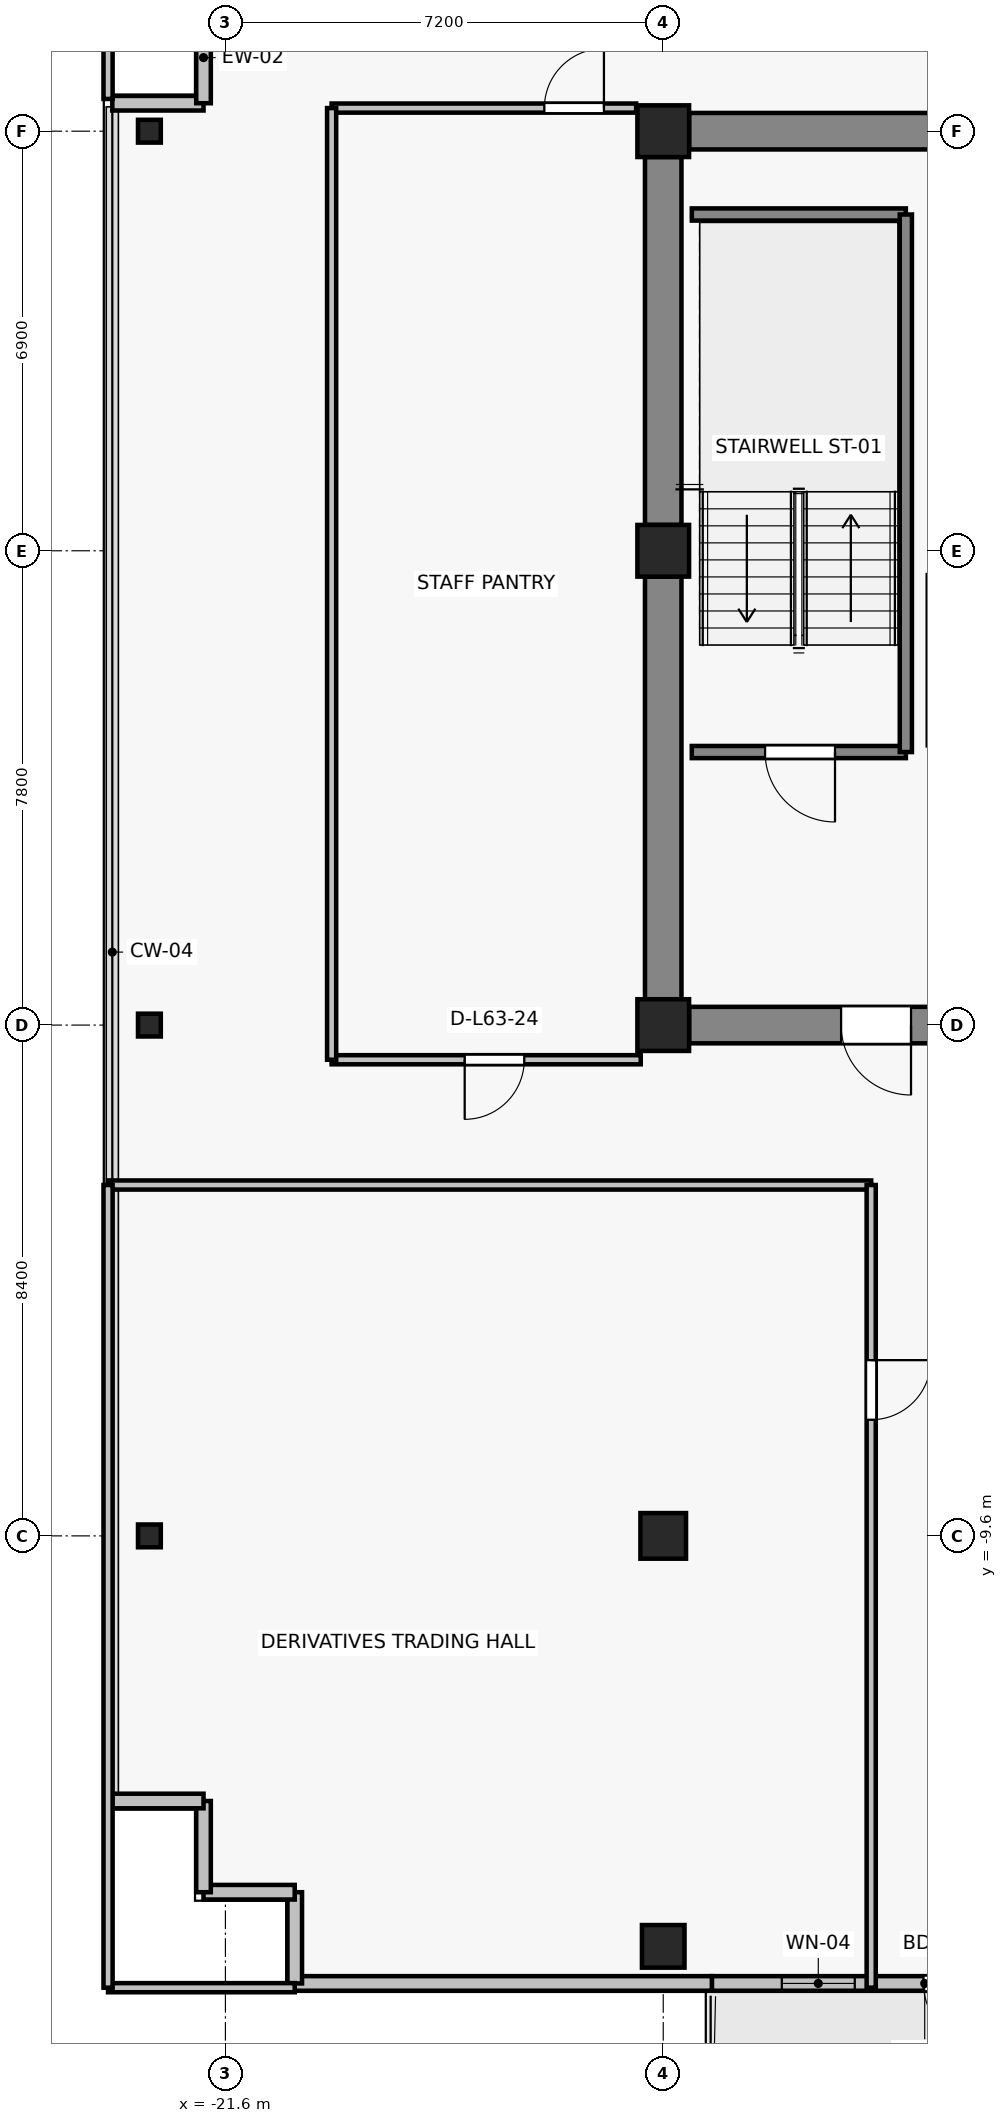
"""IFC4 building model, lengths in metres.
Left out: names, types, materials, properties, quantities, classifications, styles, units other than length and angle.
Written with IfcOpenShell. Run it as: python <this file> out.ifc"""

import sys

from ifc_helpers import new_model, si_unit, direction, frame, frame_2d, origin, origin_2d, place, context, subcontext, project, spatial, rectangle, i_section, extrude, source, transform, mapped, element, fill, save


model = new_model("IFC4")
c1 = context("Model", 3, precision=1e-05, world=origin(), true_north=direction((0.0, 1.0)))
c2 = subcontext(c1, "Body", "Model", "MODEL_VIEW")
j1 = project(units=[si_unit("LENGTHUNIT", "METRE"), si_unit("PLANEANGLEUNIT", "RADIAN")], contexts=[c1])
p1 = place(None, origin())
s1 = spatial("IfcSite", under=j1, at=p1, CompositionType="ELEMENT")
p2 = place(p1, origin())
s2 = spatial("IfcBuilding", under=s1, at=p2, CompositionType="ELEMENT")
p3 = place(p2, frame((0.0, 0.0, 225.4)))
s3 = spatial("IfcBuildingStorey", under=s2, at=p3, CompositionType="ELEMENT", Elevation=225.4)
for number, where, z_axis, x_axis in (
    (1, (-14.4, -1.2, 0.0), (0.0, 0.0, 1.0), (1.0, 0.0, 0.0)),
    (2, (-14.4, 6.6, 0.0), (0.0, 0.0, 1.0), (1.0, 0.0, 0.0)),
    (3, (-14.4, 13.5, 0.0), (0.0, 0.0, 1.0), (1.0, 0.0, 0.0)),
):
    element("IfcColumn", number, at=place(p3, frame(where, z_axis=z_axis, x_axis=x_axis)), inside=s3, PredefinedType="COLUMN", context=c2, shape_type="SweptSolid", body=[
        extrude(rectangle(XDim=0.85, YDim=0.85, at=origin_2d()), origin(), (0.0, 0.0, 1.0), 3.3),
    ])
p4 = place(p3, frame((-14.4, -9.6, 0.0), z_axis=(0.0, 0.0, 1.0), x_axis=(1.0, 0.0, 0.0)))
e4 = element("IfcColumn", 4, at=p4, inside=s3, PredefinedType="COLUMN", context=c2, shape_type="SweptSolid", body=[
    extrude(rectangle(XDim=0.75, YDim=0.75, at=origin_2d()), origin(), (0.0, 0.0, 1.0), 3.3),
])
p5 = place(p3, frame((-14.4, -16.35, 0.0), z_axis=(0.0, 0.0, 1.0), x_axis=(1.0, 0.0, 0.0)))
e5 = element("IfcColumn", 5, at=p5, inside=s3, PredefinedType="COLUMN", context=c2, shape_type="SweptSolid", body=[
    extrude(rectangle(XDim=0.7, YDim=0.7, at=origin_2d()), origin(), (0.0, 0.0, 1.0), 3.3),
])
for number, where, z_axis, x_axis in (
    (6, (-22.85, -9.6, 0.0), (0.0, 0.0, 1.0), (1.0, 0.0, 0.0)),
    (7, (-22.85, -1.2, 0.0), (0.0, 0.0, 1.0), (1.0, 0.0, 0.0)),
    (8, (-22.85, 13.5, 0.0), (0.0, 0.0, 1.0), (1.0, 0.0, 0.0)),
):
    element("IfcColumn", number, at=place(p3, frame(where, z_axis=z_axis, x_axis=x_axis)), inside=s3, PredefinedType="COLUMN", context=c2, shape_type="SweptSolid", body=[
        extrude(i_section(OverallWidth=0.375, OverallDepth=0.375, WebThickness=0.017, FlangeThickness=0.027, FilletRadius=0.015, at=origin_2d()), origin(), (0.0, 0.0, 1.0), 3.3),
    ])
p6 = place(p3, frame((-13.975, 13.5, 0.0), z_axis=(0.0, 0.0, 1.0), x_axis=(1.0, 0.0, 0.0)))
e9 = element("IfcWall", 9, at=p6, inside=s3, PredefinedType="SHEAR", context=c2, shape_type="SweptSolid", body=[
    extrude(rectangle(XDim=6.35, YDim=0.6, at=frame_2d((3.175, 0.0))), origin(), (0.0, 0.0, 1.0), 3.075),
])
p7 = place(p3, frame((-14.4, -0.775, 0.0), z_axis=(0.0, 0.0, 1.0), x_axis=(0.0, 1.0, 0.0)))
e10 = element("IfcWall", 10, at=p7, inside=s3, PredefinedType="SHEAR", context=c2, shape_type="SweptSolid", body=[
    extrude(rectangle(XDim=6.95, YDim=0.6, at=frame_2d((3.475, 0.0))), origin(), (0.0, 0.0, 1.0), 3.075),
])
p8 = place(p3, frame((-14.4, 7.025, 0.0), z_axis=(0.0, 0.0, 1.0), x_axis=(0.0, 1.0, 0.0)))
e11 = element("IfcWall", 11, at=p8, inside=s3, PredefinedType="SHEAR", context=c2, shape_type="SweptSolid", body=[
    extrude(rectangle(XDim=6.05, YDim=0.6, at=frame_2d((3.025, 0.0))), origin(), (0.0, 0.0, 1.0), 3.075),
])
p9 = place(p3, frame((-7.625, -1.2, 0.0), z_axis=(0.0, 0.0, 1.0), x_axis=(-1.0, 0.0, 0.0)))
e12 = element("IfcWall", 12, at=p9, inside=s3, PredefinedType="SHEAR", context=c2, shape_type="SweptSolid", body=[
    extrude(rectangle(XDim=6.35, YDim=0.6, at=frame_2d((3.175, 0.0))), origin(), (0.0, 0.0, 1.0), 3.075),
])
p10 = place(p9, frame((2.7, 0.0, 0.0)))
e13 = element("IfcOpeningElement", 13, at=p10, cuts=e12, PredefinedType="OPENING", context=c2, shape_type="SweptSolid", body=[
    extrude(rectangle(XDim=1.15, YDim=2.15, at=frame_2d((0.575, 1.075))), frame((0.0, 0.31, 0.0), z_axis=(0.0, -1.0, 0.0), x_axis=(1.0, 0.0, 0.0)), (0.0, 0.0, 1.0), 0.62),
])
p11 = place(p3, frame((-6.6, -16.96, 0.0), z_axis=(0.0, 0.0, 1.0), x_axis=(-1.0, 0.0, 0.0)))
e14 = element("IfcWall", 14, at=p11, inside=s3, PredefinedType="SOLIDWALL", context=c2, shape_type="SweptSolid", body=[
    extrude(rectangle(XDim=7.0, YDim=0.24, at=frame_2d((3.5, 0.0))), origin(), (0.0, 0.0, 1.0), 2.665),
])
p12 = place(p11, frame((2.52, 0.0, 0.0)))
e15 = element("IfcOpeningElement", 15, at=p12, cuts=e14, PredefinedType="OPENING", context=c2, shape_type="SweptSolid", body=[
    extrude(rectangle(XDim=1.0, YDim=2.2, at=frame_2d((0.5, 1.1))), frame((0.0, 0.13, 0.0), z_axis=(0.0, -1.0, 0.0), x_axis=(1.0, 0.0, 0.0)), (0.0, 0.0, 1.0), 0.26),
])
p13 = place(p11, frame((4.65, 0.0, 0.85)))
e16 = element("IfcOpeningElement", 16, at=p13, cuts=e14, PredefinedType="OPENING", context=c2, shape_type="SweptSolid", body=[
    extrude(rectangle(XDim=1.2, YDim=1.5, at=frame_2d((0.6, 0.75))), frame((0.0, 0.13, 0.0), z_axis=(0.0, -1.0, 0.0), x_axis=(1.0, 0.0, 0.0)), (0.0, 0.0, 1.0), 0.26),
])
for number, where, z_axis, x_axis in (
    (17, (-21.96, 13.96, 0.0), (0.0, 0.0, 1.0), (-1.0, 0.0, 0.0)),
    (18, (-21.96, 15.46, 0.0), (0.0, 0.0, 1.0), (0.0, -1.0, 0.0)),
):
    element("IfcWall", number, at=place(p3, frame(where, z_axis=z_axis, x_axis=x_axis)), inside=s3, PredefinedType="SOLIDWALL", context=c2, shape_type="SweptSolid", body=[
        extrude(rectangle(XDim=1.5, YDim=0.24, at=frame_2d((0.75, 0.0))), origin(), (0.0, 0.0, 1.0), 3.075),
    ])
p14 = place(p3, frame((-20.46, -16.96, 0.0), z_axis=(0.0, 0.0, 1.0), x_axis=(1.0, 0.0, 0.0)))
e19 = element("IfcWall", 19, at=p14, inside=s3, PredefinedType="SOLIDWALL", context=c2, shape_type="SweptSolid", body=[
    extrude(rectangle(XDim=6.86, YDim=0.24, at=frame_2d((3.43, 0.0))), origin(), (0.0, 0.0, 1.0), 2.665),
])
for number, where, z_axis, x_axis in (
    (20, (-20.46, -15.46, 0.0), (0.0, 0.0, 1.0), (0.0, -1.0, 0.0)),
    (21, (-21.96, -15.46, 0.0), (0.0, 0.0, 1.0), (1.0, 0.0, 0.0)),
    (22, (-21.96, -13.96, 0.0), (0.0, 0.0, 1.0), (0.0, -1.0, 0.0)),
    (23, (-23.46, -13.96, 0.0), (0.0, 0.0, 1.0), (1.0, 0.0, 0.0)),
):
    element("IfcWall", number, at=place(p3, frame(where, z_axis=z_axis, x_axis=x_axis)), inside=s3, PredefinedType="SOLIDWALL", context=c2, shape_type="SweptSolid", body=[
        extrude(rectangle(XDim=1.5, YDim=0.24, at=frame_2d((0.75, 0.0))), origin(), (0.0, 0.0, 1.0), 3.075),
    ])
p15 = place(p3, frame((-10.41, 3.29, 0.0), z_axis=(0.0, 0.0, 1.0), x_axis=(-1.0, 0.0, 0.0)))
e24 = element("IfcWall", 24, at=p15, inside=s3, PredefinedType="SOLIDWALL", context=c2, shape_type="SweptSolid", body=[
    extrude(rectangle(XDim=3.52, YDim=0.2, at=frame_2d((1.76, 0.0))), origin(), (0.0, 0.0, 1.0), 3.075),
])
p16 = place(p15, frame((1.165, 0.0, 0.0)))
e25 = element("IfcOpeningElement", 25, at=p16, cuts=e24, PredefinedType="OPENING", context=c2, shape_type="SweptSolid", body=[
    extrude(rectangle(XDim=1.15, YDim=2.15, at=frame_2d((0.575, 1.075))), frame((0.0, 0.11, 0.0), z_axis=(0.0, -1.0, 0.0), x_axis=(1.0, 0.0, 0.0)), (0.0, 0.0, 1.0), 0.22),
])
p17 = place(p3, frame((-13.93, 12.13, 0.0), z_axis=(0.0, 0.0, 1.0), x_axis=(1.0, 0.0, 0.0)))
e26 = element("IfcWall", 26, at=p17, inside=s3, PredefinedType="SOLIDWALL", context=c2, shape_type="SweptSolid", body=[
    extrude(rectangle(XDim=3.52, YDim=0.2, at=frame_2d((1.76, 0.0))), origin(), (0.0, 0.0, 1.0), 3.075),
])
p18 = place(p3, frame((-10.41, 12.13, 0.0), z_axis=(0.0, 0.0, 1.0), x_axis=(0.0, -1.0, 0.0)))
e27 = element("IfcWall", 27, at=p18, inside=s3, PredefinedType="SOLIDWALL", context=c2, shape_type="SweptSolid", body=[
    extrude(rectangle(XDim=8.84, YDim=0.2, at=frame_2d((4.42, 0.0))), origin(), (0.0, 0.0, 1.0), 3.075),
])
p19 = place(p3, frame((-20.46, -17.03, 0.0), z_axis=(0.0, 0.0, 1.0), x_axis=(-1.0, 0.0, 0.0)))
e28 = element("IfcWall", 28, at=p19, inside=s3, PredefinedType="PARTITIONING", context=c2, shape_type="SweptSolid", body=[
    extrude(rectangle(XDim=3.07, YDim=0.15, at=frame_2d((1.535, 0.0))), origin(), (0.0, 0.0, 1.0), 2.665),
])
p20 = place(p3, frame((-23.53, -3.83, 0.0), z_axis=(0.0, 0.0, 1.0), x_axis=(1.0, 0.0, 0.0)))
e29 = element("IfcWall", 29, at=p20, inside=s3, PredefinedType="PARTITIONING", context=c2, shape_type="SweptSolid", body=[
    extrude(rectangle(XDim=12.55, YDim=0.15, at=frame_2d((6.275, 0.0))), origin(), (0.0, 0.0, 1.0), 2.615),
])
p21 = place(p3, frame((-23.53, -17.03, 0.0), z_axis=(0.0, 0.0, 1.0), x_axis=(0.0, 1.0, 0.0)))
e30 = element("IfcWall", 30, at=p21, inside=s3, PredefinedType="PARTITIONING", context=c2, shape_type="SweptSolid", body=[
    extrude(rectangle(XDim=13.2, YDim=0.15, at=frame_2d((6.6, 0.0))), origin(), (0.0, 0.0, 1.0), 2.665),
])
p22 = place(p3, frame((-10.98, -3.83, 0.0), z_axis=(0.0, 0.0, 1.0), x_axis=(0.0, -1.0, 0.0)))
e31 = element("IfcWall", 31, at=p22, inside=s3, PredefinedType="PARTITIONING", context=c2, shape_type="SweptSolid", body=[
    extrude(rectangle(XDim=13.2, YDim=0.15, at=frame_2d((6.6, 0.0))), origin(), (0.0, 0.0, 1.0), 2.615),
])
p23 = place(p22, frame((2.88, 0.0, 0.0)))
e32 = element("IfcOpeningElement", 32, at=p23, cuts=e31, PredefinedType="OPENING", context=c2, shape_type="SweptSolid", body=[
    extrude(rectangle(XDim=0.98, YDim=2.15, at=frame_2d((0.49, 1.075))), frame((0.0, 0.085, 0.0), z_axis=(0.0, -1.0, 0.0), x_axis=(1.0, 0.0, 0.0)), (0.0, 0.0, 1.0), 0.17),
])
p24 = place(p3, frame((-14.77, -1.77, 0.0), z_axis=(0.0, 0.0, 1.0), x_axis=(-1.0, 0.0, 0.0)))
e33 = element("IfcWall", 33, at=p24, inside=s3, PredefinedType="PARTITIONING", context=c2, shape_type="SweptSolid", body=[
    extrude(rectangle(XDim=5.083, YDim=0.15, at=frame_2d((2.542, 0.0))), origin(), (0.0, 0.0, 1.0), 3.075),
])
p25 = place(p24, frame((1.915, 0.0, 0.0)))
e34 = element("IfcOpeningElement", 34, at=p25, cuts=e33, PredefinedType="OPENING", context=c2, shape_type="SweptSolid", body=[
    extrude(rectangle(XDim=0.98, YDim=2.15, at=frame_2d((0.49, 1.075))), frame((0.0, 0.085, 0.0), z_axis=(0.0, -1.0, 0.0), x_axis=(1.0, 0.0, 0.0)), (0.0, 0.0, 1.0), 0.17),
])
p26 = place(p3, frame((-19.853, 13.88, 0.0), z_axis=(0.0, 0.0, 1.0), x_axis=(1.0, 0.0, 0.0)))
e35 = element("IfcWall", 35, at=p26, inside=s3, PredefinedType="PARTITIONING", context=c2, shape_type="SweptSolid", body=[
    extrude(rectangle(XDim=5.008, YDim=0.15, at=frame_2d((2.504, 0.0))), origin(), (0.0, 0.0, 1.0), 3.075),
])
p27 = place(p26, frame((3.498, 0.0, 0.0)))
e36 = element("IfcOpeningElement", 36, at=p27, cuts=e35, PredefinedType="OPENING", context=c2, shape_type="SweptSolid", body=[
    extrude(rectangle(XDim=0.98, YDim=2.15, at=frame_2d((0.49, 1.075))), frame((0.0, 0.085, 0.0), z_axis=(0.0, -1.0, 0.0), x_axis=(1.0, 0.0, 0.0)), (0.0, 0.0, 1.0), 0.17),
])
p28 = place(p3, frame((-19.853, -1.77, 0.0), z_axis=(0.0, 0.0, 1.0), x_axis=(0.0, 1.0, 0.0)))
e37 = element("IfcWall", 37, at=p28, inside=s3, PredefinedType="PARTITIONING", context=c2, shape_type="SweptSolid", body=[
    extrude(rectangle(XDim=15.65, YDim=0.15, at=frame_2d((7.825, 0.0))), origin(), (0.0, 0.0, 1.0), 2.615),
])
p29 = place(p3, frame((-23.53, 14.03, 0.0), z_axis=(0.0, 0.0, 1.0), x_axis=(0.0, 1.0, 0.0)))
e38 = element("IfcWall", 38, at=p29, inside=s3, PredefinedType="PARTITIONING", context=c2, shape_type="SweptSolid", body=[
    extrude(rectangle(XDim=3.0, YDim=0.15, at=frame_2d((1.5, 0.0))), origin(), (0.0, 0.0, 1.0), 3.075),
])
m1 = source(origin(), c2, "Body", "SweptSolid", [
    extrude(rectangle(XDim=1.0, YDim=2.2, at=frame_2d((0.5, 1.1))), frame((0.0, 0.025, 0.0), z_axis=(0.0, -1.0, 0.0), x_axis=(1.0, 0.0, 0.0)), (0.0, 0.0, 1.0), 0.05),
])
p30 = place(p12, origin())
e39 = element("IfcDoor", 39, at=p30, inside=s3, OperationType="SINGLE_SWING_LEFT", PredefinedType="DOOR", context=c2, shape_type="MappedRepresentation", body=[
    mapped(m1, transform((0.0, 0.0, 0.0), x_axis=(1.0, 0.0, 0.0), y_axis=(0.0, 1.0, 0.0), z_axis=(0.0, 0.0, 1.0), scale=1.0)),
])
fill(e15, e39)
m2 = source(origin(), c2, "Body", "SweptSolid", [
    extrude(rectangle(XDim=1.2, YDim=1.5, at=frame_2d((0.6, 0.75))), frame((0.0, 0.03, 0.0), z_axis=(0.0, -1.0, 0.0), x_axis=(1.0, 0.0, 0.0)), (0.0, 0.0, 1.0), 0.06),
])
p31 = place(p13, origin())
e40 = element("IfcWindow", 40, at=p31, inside=s3, PartitioningType="SINGLE_PANEL", PredefinedType="WINDOW", context=c2, shape_type="MappedRepresentation", body=[
    mapped(m2, transform((0.0, 0.0, 0.0), x_axis=(1.0, 0.0, 0.0), y_axis=(0.0, 1.0, 0.0), z_axis=(0.0, 0.0, 1.0), scale=1.0)),
])
fill(e16, e40)
m3 = source(origin(), c2, "Body", "SweptSolid", [
    extrude(rectangle(XDim=1.15, YDim=2.15, at=frame_2d((0.575, 1.075))), frame((0.0, 0.025, 0.0), z_axis=(0.0, -1.0, 0.0), x_axis=(1.0, 0.0, 0.0)), (0.0, 0.0, 1.0), 0.05),
])
p32 = place(p16, origin())
e41 = element("IfcDoor", 41, at=p32, inside=s3, OperationType="SINGLE_SWING_LEFT", PredefinedType="DOOR", context=c2, shape_type="MappedRepresentation", body=[
    mapped(m3, transform((0.0, 0.0, 0.0), x_axis=(1.0, 0.0, 0.0), y_axis=(0.0, 1.0, 0.0), z_axis=(0.0, 0.0, 1.0), scale=1.0)),
])
fill(e25, e41)
p33 = place(p10, origin())
e42 = element("IfcDoor", 42, at=p33, inside=s3, OperationType="SINGLE_SWING_LEFT", PredefinedType="DOOR", context=c2, shape_type="MappedRepresentation", body=[
    mapped(m3, transform((0.0, 0.0, 0.0), x_axis=(1.0, 0.0, 0.0), y_axis=(0.0, 1.0, 0.0), z_axis=(0.0, 0.0, 1.0), scale=1.0)),
])
fill(e13, e42)
m4 = source(origin(), c2, "Body", "SweptSolid", [
    extrude(rectangle(XDim=0.98, YDim=2.15, at=frame_2d((0.49, 1.075))), frame((0.0, 0.025, 0.0), z_axis=(0.0, -1.0, 0.0), x_axis=(1.0, 0.0, 0.0)), (0.0, 0.0, 1.0), 0.05),
])
p34 = place(p23, origin())
e43 = element("IfcDoor", 43, at=p34, inside=s3, OperationType="SINGLE_SWING_LEFT", PredefinedType="DOOR", context=c2, shape_type="MappedRepresentation", body=[
    mapped(m4, transform((0.0, 0.0, 0.0), x_axis=(1.0, 0.0, 0.0), y_axis=(0.0, 1.0, 0.0), z_axis=(0.0, 0.0, 1.0), scale=1.0)),
])
fill(e32, e43)
p35 = place(p25, origin())
e44 = element("IfcDoor", 44, at=p35, inside=s3, OperationType="SINGLE_SWING_RIGHT", PredefinedType="DOOR", context=c2, shape_type="MappedRepresentation", body=[
    mapped(m4, transform((0.0, 0.0, 0.0), x_axis=(1.0, 0.0, 0.0), y_axis=(0.0, 1.0, 0.0), z_axis=(0.0, 0.0, 1.0), scale=1.0)),
])
fill(e34, e44)
p36 = place(p27, origin())
e45 = element("IfcDoor", 45, at=p36, inside=s3, OperationType="SINGLE_SWING_RIGHT", PredefinedType="DOOR", context=c2, shape_type="MappedRepresentation", body=[
    mapped(m4, transform((0.0, 0.0, 0.0), x_axis=(1.0, 0.0, 0.0), y_axis=(0.0, 1.0, 0.0), z_axis=(0.0, 0.0, 1.0), scale=1.0)),
])
fill(e36, e45)
save(model, sys.argv[1])
